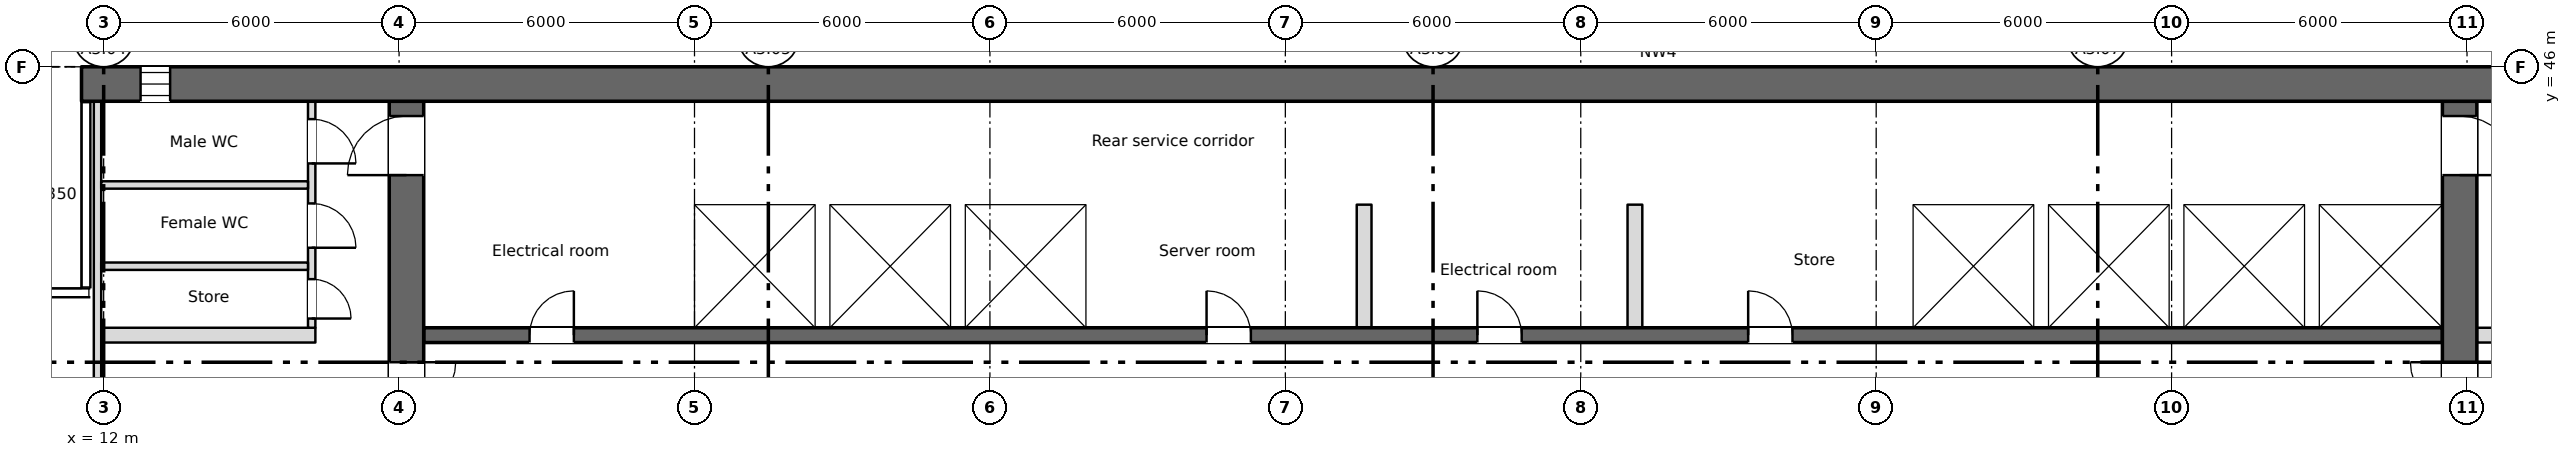
"""IFC4 building model, lengths in metres.
Left out: names, types, materials, properties, quantities, classifications, styles, units other than length and angle.
Written with IfcOpenShell. Run it as: python <this file> out.ifc"""

import sys

from ifc_helpers import new_model, si_unit, direction, frame, frame_2d, origin, place, context, subcontext, project, spatial, rectangle, extrude, element, fill, save


model = new_model("IFC4")
c1 = context("Model", 3, precision=1e-05, world=origin(), true_north=direction((0.0, 1.0)))
c2 = subcontext(c1, "Body", "Model", "MODEL_VIEW")
j1 = project(units=[si_unit("LENGTHUNIT", "METRE"), si_unit("PLANEANGLEUNIT", "RADIAN")], contexts=[c1])
p1 = place(None, origin())
s1 = spatial("IfcSite", under=j1, at=p1, CompositionType="ELEMENT")
p2 = place(p1, origin())
s2 = spatial("IfcBuilding", under=s1, at=p2, CompositionType="ELEMENT")
p3 = place(p2, frame((0.0, 0.0, 178.0)))
s3 = spatial("IfcBuildingStorey", under=s2, at=p3, CompositionType="ELEMENT", Elevation=178.0)
p4 = place(p3, frame((11.55, 45.65, 0.0), z_axis=(0.0, 0.0, 1.0), x_axis=(1.0, 0.0, 0.0)))
e1 = element("IfcWall", 1, at=p4, inside=s3, PredefinedType="SHEAR", context=c2, shape_type="SweptSolid", body=[
    extrude(rectangle(XDim=54.9, YDim=0.7, at=frame_2d((27.45, 0.0))), origin(), (0.0, 0.0, 1.0), 3.35),
])
p5 = place(p4, frame((1.2, 0.0, 0.6)))
e2 = element("IfcOpeningElement", 2, at=p5, cuts=e1, PredefinedType="OPENING", context=c2, shape_type="SweptSolid", body=[
    extrude(rectangle(XDim=0.6, YDim=2.4, at=frame_2d((0.3, 1.2))), frame((0.0, 0.36, 0.0), z_axis=(0.0, -1.0, 0.0), x_axis=(1.0, 0.0, 0.0)), (0.0, 0.0, 1.0), 0.72),
])
p6 = place(p3, frame((18.15, 28.4, 0.0), z_axis=(0.0, 0.0, 1.0), x_axis=(0.0, 1.0, 0.0)))
e3 = element("IfcWall", 3, at=p6, inside=s3, PredefinedType="SHEAR", context=c2, shape_type="SweptSolid", body=[
    extrude(rectangle(XDim=16.9, YDim=0.7, at=frame_2d((8.45, 0.0))), origin(), (0.0, 0.0, 1.0), 3.35),
])
p7 = place(p6, frame((9.6, 0.0, 0.0)))
e4 = element("IfcOpeningElement", 4, at=p7, cuts=e3, PredefinedType="OPENING", context=c2, shape_type="SweptSolid", body=[
    extrude(rectangle(XDim=2.0, YDim=2.1, at=frame_2d((1.0, 1.05))), frame((0.0, 0.36, 0.0), z_axis=(0.0, -1.0, 0.0), x_axis=(1.0, 0.0, 0.0)), (0.0, 0.0, 1.0), 0.72),
])
p8 = place(p6, frame((15.4, 0.0, 0.0)))
e5 = element("IfcOpeningElement", 5, at=p8, cuts=e3, PredefinedType="OPENING", context=c2, shape_type="SweptSolid", body=[
    extrude(rectangle(XDim=1.2, YDim=2.1, at=frame_2d((0.6, 1.05))), frame((0.0, 0.36, 0.0), z_axis=(0.0, -1.0, 0.0), x_axis=(1.0, 0.0, 0.0)), (0.0, 0.0, 1.0), 0.72),
])
p9 = place(p3, frame((59.85, 28.4, 0.0), z_axis=(0.0, 0.0, 1.0), x_axis=(0.0, 1.0, 0.0)))
e6 = element("IfcWall", 6, at=p9, inside=s3, PredefinedType="SHEAR", context=c2, shape_type="SweptSolid", body=[
    extrude(rectangle(XDim=16.9, YDim=0.7, at=frame_2d((8.45, 0.0))), origin(), (0.0, 0.0, 1.0), 3.35),
])
p10 = place(p9, frame((9.6, 0.0, 0.0)))
e7 = element("IfcOpeningElement", 7, at=p10, cuts=e6, PredefinedType="OPENING", context=c2, shape_type="SweptSolid", body=[
    extrude(rectangle(XDim=2.0, YDim=2.1, at=frame_2d((1.0, 1.05))), frame((0.0, 0.36, 0.0), z_axis=(0.0, -1.0, 0.0), x_axis=(1.0, 0.0, 0.0)), (0.0, 0.0, 1.0), 0.72),
])
p11 = place(p9, frame((15.4, 0.0, 0.0)))
e8 = element("IfcOpeningElement", 8, at=p11, cuts=e6, PredefinedType="OPENING", context=c2, shape_type="SweptSolid", body=[
    extrude(rectangle(XDim=1.2, YDim=2.1, at=frame_2d((0.6, 1.05))), frame((0.0, 0.36, 0.0), z_axis=(0.0, -1.0, 0.0), x_axis=(1.0, 0.0, 0.0)), (0.0, 0.0, 1.0), 0.72),
])
p12 = place(p3, frame((18.5, 40.55, 0.0), z_axis=(0.0, 0.0, 1.0), x_axis=(1.0, 0.0, 0.0)))
e9 = element("IfcWall", 9, at=p12, inside=s3, PredefinedType="SHEAR", context=c2, shape_type="SweptSolid", body=[
    extrude(rectangle(XDim=41.0, YDim=0.3, at=frame_2d((20.5, 0.0))), origin(), (0.0, 0.0, 1.0), 3.35),
])
p13 = place(p12, frame((2.15, 0.0, 0.0)))
e10 = element("IfcOpeningElement", 10, at=p13, cuts=e9, PredefinedType="OPENING", context=c2, shape_type="SweptSolid", body=[
    extrude(rectangle(XDim=0.9, YDim=2.1, at=frame_2d((0.45, 1.05))), frame((0.0, 0.16, 0.0), z_axis=(0.0, -1.0, 0.0), x_axis=(1.0, 0.0, 0.0)), (0.0, 0.0, 1.0), 0.32),
])
p14 = place(p12, frame((15.9, 0.0, 0.0)))
e11 = element("IfcOpeningElement", 11, at=p14, cuts=e9, PredefinedType="OPENING", context=c2, shape_type="SweptSolid", body=[
    extrude(rectangle(XDim=0.9, YDim=2.1, at=frame_2d((0.45, 1.05))), frame((0.0, 0.16, 0.0), z_axis=(0.0, -1.0, 0.0), x_axis=(1.0, 0.0, 0.0)), (0.0, 0.0, 1.0), 0.32),
])
p15 = place(p12, frame((21.4, 0.0, 0.0)))
e12 = element("IfcOpeningElement", 12, at=p15, cuts=e9, PredefinedType="OPENING", context=c2, shape_type="SweptSolid", body=[
    extrude(rectangle(XDim=0.9, YDim=2.1, at=frame_2d((0.45, 1.05))), frame((0.0, 0.16, 0.0), z_axis=(0.0, -1.0, 0.0), x_axis=(1.0, 0.0, 0.0)), (0.0, 0.0, 1.0), 0.32),
])
p16 = place(p12, frame((26.9, 0.0, 0.0)))
e13 = element("IfcOpeningElement", 13, at=p16, cuts=e9, PredefinedType="OPENING", context=c2, shape_type="SweptSolid", body=[
    extrude(rectangle(XDim=0.9, YDim=2.1, at=frame_2d((0.45, 1.05))), frame((0.0, 0.16, 0.0), z_axis=(0.0, -1.0, 0.0), x_axis=(1.0, 0.0, 0.0)), (0.0, 0.0, 1.0), 0.32),
])
p17 = place(p12, frame((6.175, 0.0, 0.0)))
e14 = element("IfcOpeningElement", 14, at=p17, cuts=e9, PredefinedType="OPENING", context=c2, shape_type="SweptSolid", body=[
    extrude(rectangle(XDim=1.1, YDim=2.1, at=frame_2d((0.55, 1.05))), frame((0.0, 0.16, 0.0), z_axis=(0.0, -1.0, 0.0), x_axis=(1.0, 0.0, 0.0)), (0.0, 0.0, 1.0), 0.32),
])
p18 = place(p12, frame((8.925, 0.0, 0.0)))
e15 = element("IfcOpeningElement", 15, at=p18, cuts=e9, PredefinedType="OPENING", context=c2, shape_type="SweptSolid", body=[
    extrude(rectangle(XDim=1.1, YDim=2.1, at=frame_2d((0.55, 1.05))), frame((0.0, 0.16, 0.0), z_axis=(0.0, -1.0, 0.0), x_axis=(1.0, 0.0, 0.0)), (0.0, 0.0, 1.0), 0.32),
])
p19 = place(p12, frame((11.675, 0.0, 0.0)))
e16 = element("IfcOpeningElement", 16, at=p19, cuts=e9, PredefinedType="OPENING", context=c2, shape_type="SweptSolid", body=[
    extrude(rectangle(XDim=1.1, YDim=2.1, at=frame_2d((0.55, 1.05))), frame((0.0, 0.16, 0.0), z_axis=(0.0, -1.0, 0.0), x_axis=(1.0, 0.0, 0.0)), (0.0, 0.0, 1.0), 0.32),
])
p20 = place(p12, frame((30.925, 0.0, 0.0)))
e17 = element("IfcOpeningElement", 17, at=p20, cuts=e9, PredefinedType="OPENING", context=c2, shape_type="SweptSolid", body=[
    extrude(rectangle(XDim=1.1, YDim=2.1, at=frame_2d((0.55, 1.05))), frame((0.0, 0.16, 0.0), z_axis=(0.0, -1.0, 0.0), x_axis=(1.0, 0.0, 0.0)), (0.0, 0.0, 1.0), 0.32),
])
p21 = place(p12, frame((33.675, 0.0, 0.0)))
e18 = element("IfcOpeningElement", 18, at=p21, cuts=e9, PredefinedType="OPENING", context=c2, shape_type="SweptSolid", body=[
    extrude(rectangle(XDim=1.1, YDim=2.1, at=frame_2d((0.55, 1.05))), frame((0.0, 0.16, 0.0), z_axis=(0.0, -1.0, 0.0), x_axis=(1.0, 0.0, 0.0)), (0.0, 0.0, 1.0), 0.32),
])
p22 = place(p12, frame((36.375, 0.0, 0.0)))
e19 = element("IfcOpeningElement", 19, at=p22, cuts=e9, PredefinedType="OPENING", context=c2, shape_type="SweptSolid", body=[
    extrude(rectangle(XDim=1.2, YDim=2.1, at=frame_2d((0.6, 1.05))), frame((0.0, 0.16, 0.0), z_axis=(0.0, -1.0, 0.0), x_axis=(1.0, 0.0, 0.0)), (0.0, 0.0, 1.0), 0.32),
])
p23 = place(p12, frame((39.15, 0.0, 0.0)))
e20 = element("IfcOpeningElement", 20, at=p23, cuts=e9, PredefinedType="OPENING", context=c2, shape_type="SweptSolid", body=[
    extrude(rectangle(XDim=1.2, YDim=2.1, at=frame_2d((0.6, 1.05))), frame((0.0, 0.16, 0.0), z_axis=(0.0, -1.0, 0.0), x_axis=(1.0, 0.0, 0.0)), (0.0, 0.0, 1.0), 0.32),
])
p24 = place(p3, frame((18.5, 43.35, 0.0), z_axis=(0.0, 0.0, 1.0), x_axis=(1.0, 0.0, 0.0)))
e21 = element("IfcWall", 21, at=p24, inside=s3, PredefinedType="SHEAR", context=c2, shape_type="SweptSolid", body=[
    extrude(rectangle(XDim=41.0, YDim=0.3, at=frame_2d((20.5, 0.0))), origin(), (0.0, 0.0, 1.0), 3.35),
])
p25 = place(p3, frame((11.95, 40.55, 0.0), z_axis=(0.0, 0.0, 1.0), x_axis=(1.0, 0.0, 0.0)))
e22 = element("IfcWall", 22, at=p25, inside=s3, PredefinedType="PARTITIONING", context=c2, shape_type="SweptSolid", body=[
    extrude(rectangle(XDim=4.35, YDim=0.3, at=frame_2d((2.175, 0.0))), origin(), (0.0, 0.0, 1.0), 3.35),
])
p26 = place(p3, frame((60.2, 40.55, 0.0), z_axis=(0.0, 0.0, 1.0), x_axis=(1.0, 0.0, 0.0)))
e23 = element("IfcWall", 23, at=p26, inside=s3, PredefinedType="PARTITIONING", context=c2, shape_type="SweptSolid", body=[
    extrude(rectangle(XDim=2.5, YDim=0.3, at=frame_2d((1.25, 0.0))), origin(), (0.0, 0.0, 1.0), 3.35),
])
p27 = place(p26, frame((0.725, 0.0, 0.0)))
e24 = element("IfcOpeningElement", 24, at=p27, cuts=e23, PredefinedType="OPENING", context=c2, shape_type="SweptSolid", body=[
    extrude(rectangle(XDim=0.9, YDim=2.1, at=frame_2d((0.45, 1.05))), frame((0.0, 0.16, 0.0), z_axis=(0.0, -1.0, 0.0), x_axis=(1.0, 0.0, 0.0)), (0.0, 0.0, 1.0), 0.32),
])
for number, where, z_axis, x_axis in (
    (25, (23.85, 40.7, 0.0), (0.0, 0.0, 1.0), (0.0, 1.0, 0.0)),
    (26, (26.6, 40.7, 0.0), (0.0, 0.0, 1.0), (0.0, 1.0, 0.0)),
    (27, (29.35, 40.7, 0.0), (0.0, 0.0, 1.0), (0.0, 1.0, 0.0)),
    (28, (32.1, 40.7, 0.0), (0.0, 0.0, 1.0), (0.0, 1.0, 0.0)),
    (29, (48.6, 40.7, 0.0), (0.0, 0.0, 1.0), (0.0, 1.0, 0.0)),
    (30, (51.35, 40.7, 0.0), (0.0, 0.0, 1.0), (0.0, 1.0, 0.0)),
    (31, (54.1, 40.7, 0.0), (0.0, 0.0, 1.0), (0.0, 1.0, 0.0)),
    (32, (56.85, 40.7, 0.0), (0.0, 0.0, 1.0), (0.0, 1.0, 0.0)),
):
    element("IfcWall", number, at=place(p3, frame(where, z_axis=z_axis, x_axis=x_axis)), inside=s3, PredefinedType="SHEAR", context=c2, shape_type="SweptSolid", body=[
        extrude(rectangle(XDim=2.5, YDim=0.3, at=frame_2d((1.25, 0.0))), origin(), (0.0, 0.0, 1.0), 3.35),
    ])
p28 = place(p3, frame((16.225, 45.3, 0.0), z_axis=(0.0, 0.0, 1.0), x_axis=(0.0, -1.0, 0.0)))
e33 = element("IfcWall", 33, at=p28, inside=s3, PredefinedType="PARTITIONING", context=c2, shape_type="SweptSolid", body=[
    extrude(rectangle(XDim=4.6, YDim=0.15, at=frame_2d((2.3, 0.0))), origin(), (0.0, 0.0, 1.0), 3.35),
])
p29 = place(p28, frame((3.613, 0.0, 0.0)))
e34 = element("IfcOpeningElement", 34, at=p29, cuts=e33, PredefinedType="OPENING", context=c2, shape_type="SweptSolid", body=[
    extrude(rectangle(XDim=0.8, YDim=2.1, at=frame_2d((0.4, 1.05))), frame((0.0, 0.085, 0.0), z_axis=(0.0, -1.0, 0.0), x_axis=(1.0, 0.0, 0.0)), (0.0, 0.0, 1.0), 0.17),
])
p30 = place(p28, frame((2.075, 0.0, 0.0)))
e35 = element("IfcOpeningElement", 35, at=p30, cuts=e33, PredefinedType="OPENING", context=c2, shape_type="SweptSolid", body=[
    extrude(rectangle(XDim=0.9, YDim=2.1, at=frame_2d((0.45, 1.05))), frame((0.0, 0.085, 0.0), z_axis=(0.0, -1.0, 0.0), x_axis=(1.0, 0.0, 0.0)), (0.0, 0.0, 1.0), 0.17),
])
p31 = place(p28, frame((0.363, 0.0, 0.0)))
e36 = element("IfcOpeningElement", 36, at=p31, cuts=e33, PredefinedType="OPENING", context=c2, shape_type="SweptSolid", body=[
    extrude(rectangle(XDim=0.9, YDim=2.1, at=frame_2d((0.45, 1.05))), frame((0.0, 0.085, 0.0), z_axis=(0.0, -1.0, 0.0), x_axis=(1.0, 0.0, 0.0)), (0.0, 0.0, 1.0), 0.17),
])
p32 = place(p3, frame((11.875, 39.45, 0.0), z_axis=(0.0, 0.0, 1.0), x_axis=(0.0, 1.0, 0.0)))
e37 = element("IfcWall", 37, at=p32, inside=s3, PredefinedType="PARTITIONING", context=c2, shape_type="SweptSolid", body=[
    extrude(rectangle(XDim=5.85, YDim=0.15, at=frame_2d((2.925, 0.0))), origin(), (0.0, 0.0, 1.0), 3.35),
])
for number, where, z_axis, x_axis in (
    (38, (11.95, 41.95, 0.0), (0.0, 0.0, 1.0), (1.0, 0.0, 0.0)),
    (39, (11.95, 43.6, 0.0), (0.0, 0.0, 1.0), (1.0, 0.0, 0.0)),
):
    element("IfcWall", number, at=place(p3, frame(where, z_axis=z_axis, x_axis=x_axis)), inside=s3, PredefinedType="PARTITIONING", context=c2, shape_type="SweptSolid", body=[
        extrude(rectangle(XDim=4.2, YDim=0.15, at=frame_2d((2.1, 0.0))), origin(), (0.0, 0.0, 1.0), 3.35),
    ])
for number, where, z_axis, x_axis in (
    (40, (37.6, 40.7, 0.0), (0.0, 0.0, 1.0), (0.0, 1.0, 0.0)),
    (41, (43.1, 40.7, 0.0), (0.0, 0.0, 1.0), (0.0, 1.0, 0.0)),
):
    element("IfcWall", number, at=place(p3, frame(where, z_axis=z_axis, x_axis=x_axis)), inside=s3, PredefinedType="PARTITIONING", context=c2, shape_type="SweptSolid", body=[
        extrude(rectangle(XDim=2.5, YDim=0.3, at=frame_2d((1.25, 0.0))), origin(), (0.0, 0.0, 1.0), 3.35),
    ])
p33 = place(p5, origin())
e42 = element("IfcWindow", 42, at=p33, inside=s3, PartitioningType="SINGLE_PANEL", PredefinedType="WINDOW", context=c2, shape_type="SweptSolid", body=[
    extrude(rectangle(XDim=0.6, YDim=2.4, at=frame_2d((0.3, 1.2))), frame((0.0, 0.03, 0.0), z_axis=(0.0, -1.0, 0.0), x_axis=(1.0, 0.0, 0.0)), (0.0, 0.0, 1.0), 0.06),
])
fill(e2, e42)
p34 = place(p29, origin())
e43 = element("IfcDoor", 43, at=p34, inside=s3, OperationType="SINGLE_SWING_RIGHT", PredefinedType="DOOR", context=c2, shape_type="SweptSolid", body=[
    extrude(rectangle(XDim=0.8, YDim=2.1, at=frame_2d((0.4, 1.05))), frame((0.0, 0.025, 0.0), z_axis=(0.0, -1.0, 0.0), x_axis=(1.0, 0.0, 0.0)), (0.0, 0.0, 1.0), 0.05),
])
fill(e34, e43)
p35 = place(p30, origin())
e44 = element("IfcDoor", 44, at=p35, inside=s3, OperationType="SINGLE_SWING_RIGHT", PredefinedType="DOOR", context=c2, shape_type="SweptSolid", body=[
    extrude(rectangle(XDim=0.9, YDim=2.1, at=frame_2d((0.45, 1.05))), frame((0.0, 0.025, 0.0), z_axis=(0.0, -1.0, 0.0), x_axis=(1.0, 0.0, 0.0)), (0.0, 0.0, 1.0), 0.05),
])
fill(e35, e44)
p36 = place(p31, origin())
e45 = element("IfcDoor", 45, at=p36, inside=s3, OperationType="SINGLE_SWING_RIGHT", PredefinedType="DOOR", context=c2, shape_type="SweptSolid", body=[
    extrude(rectangle(XDim=0.9, YDim=2.1, at=frame_2d((0.45, 1.05))), frame((0.0, 0.025, 0.0), z_axis=(0.0, -1.0, 0.0), x_axis=(1.0, 0.0, 0.0)), (0.0, 0.0, 1.0), 0.05),
])
fill(e36, e45)
p37 = place(p13, origin())
e46 = element("IfcDoor", 46, at=p37, inside=s3, OperationType="SINGLE_SWING_RIGHT", PredefinedType="DOOR", context=c2, shape_type="SweptSolid", body=[
    extrude(rectangle(XDim=0.9, YDim=2.1, at=frame_2d((0.45, 1.05))), frame((0.0, 0.025, 0.0), z_axis=(0.0, -1.0, 0.0), x_axis=(1.0, 0.0, 0.0)), (0.0, 0.0, 1.0), 0.05),
])
fill(e10, e46)
p38 = place(p14, origin())
e47 = element("IfcDoor", 47, at=p38, inside=s3, OperationType="SINGLE_SWING_LEFT", PredefinedType="DOOR", context=c2, shape_type="SweptSolid", body=[
    extrude(rectangle(XDim=0.9, YDim=2.1, at=frame_2d((0.45, 1.05))), frame((0.0, 0.025, 0.0), z_axis=(0.0, -1.0, 0.0), x_axis=(1.0, 0.0, 0.0)), (0.0, 0.0, 1.0), 0.05),
])
fill(e11, e47)
p39 = place(p15, origin())
e48 = element("IfcDoor", 48, at=p39, inside=s3, OperationType="SINGLE_SWING_LEFT", PredefinedType="DOOR", context=c2, shape_type="SweptSolid", body=[
    extrude(rectangle(XDim=0.9, YDim=2.1, at=frame_2d((0.45, 1.05))), frame((0.0, 0.025, 0.0), z_axis=(0.0, -1.0, 0.0), x_axis=(1.0, 0.0, 0.0)), (0.0, 0.0, 1.0), 0.05),
])
fill(e12, e48)
p40 = place(p16, origin())
e49 = element("IfcDoor", 49, at=p40, inside=s3, OperationType="SINGLE_SWING_LEFT", PredefinedType="DOOR", context=c2, shape_type="SweptSolid", body=[
    extrude(rectangle(XDim=0.9, YDim=2.1, at=frame_2d((0.45, 1.05))), frame((0.0, 0.025, 0.0), z_axis=(0.0, -1.0, 0.0), x_axis=(1.0, 0.0, 0.0)), (0.0, 0.0, 1.0), 0.05),
])
fill(e13, e49)
p41 = place(p17, origin())
e50 = element("IfcDoor", 50, at=p41, inside=s3, OperationType="SLIDING_TO_LEFT", PredefinedType="DOOR", context=c2, shape_type="SweptSolid", body=[
    extrude(rectangle(XDim=1.1, YDim=2.1, at=frame_2d((0.55, 1.05))), frame((0.0, 0.025, 0.0), z_axis=(0.0, -1.0, 0.0), x_axis=(1.0, 0.0, 0.0)), (0.0, 0.0, 1.0), 0.05),
])
fill(e14, e50)
p42 = place(p18, origin())
e51 = element("IfcDoor", 51, at=p42, inside=s3, OperationType="SLIDING_TO_LEFT", PredefinedType="DOOR", context=c2, shape_type="SweptSolid", body=[
    extrude(rectangle(XDim=1.1, YDim=2.1, at=frame_2d((0.55, 1.05))), frame((0.0, 0.025, 0.0), z_axis=(0.0, -1.0, 0.0), x_axis=(1.0, 0.0, 0.0)), (0.0, 0.0, 1.0), 0.05),
])
fill(e15, e51)
p43 = place(p19, origin())
e52 = element("IfcDoor", 52, at=p43, inside=s3, OperationType="SLIDING_TO_LEFT", PredefinedType="DOOR", context=c2, shape_type="SweptSolid", body=[
    extrude(rectangle(XDim=1.1, YDim=2.1, at=frame_2d((0.55, 1.05))), frame((0.0, 0.025, 0.0), z_axis=(0.0, -1.0, 0.0), x_axis=(1.0, 0.0, 0.0)), (0.0, 0.0, 1.0), 0.05),
])
fill(e16, e52)
p44 = place(p20, origin())
e53 = element("IfcDoor", 53, at=p44, inside=s3, OperationType="SLIDING_TO_LEFT", PredefinedType="DOOR", context=c2, shape_type="SweptSolid", body=[
    extrude(rectangle(XDim=1.1, YDim=2.1, at=frame_2d((0.55, 1.05))), frame((0.0, 0.025, 0.0), z_axis=(0.0, -1.0, 0.0), x_axis=(1.0, 0.0, 0.0)), (0.0, 0.0, 1.0), 0.05),
])
fill(e17, e53)
p45 = place(p21, origin())
e54 = element("IfcDoor", 54, at=p45, inside=s3, OperationType="SLIDING_TO_LEFT", PredefinedType="DOOR", context=c2, shape_type="SweptSolid", body=[
    extrude(rectangle(XDim=1.1, YDim=2.1, at=frame_2d((0.55, 1.05))), frame((0.0, 0.025, 0.0), z_axis=(0.0, -1.0, 0.0), x_axis=(1.0, 0.0, 0.0)), (0.0, 0.0, 1.0), 0.05),
])
fill(e18, e54)
p46 = place(p22, origin())
e55 = element("IfcDoor", 55, at=p46, inside=s3, OperationType="SLIDING_TO_LEFT", PredefinedType="DOOR", context=c2, shape_type="SweptSolid", body=[
    extrude(rectangle(XDim=1.2, YDim=2.1, at=frame_2d((0.6, 1.05))), frame((0.0, 0.025, 0.0), z_axis=(0.0, -1.0, 0.0), x_axis=(1.0, 0.0, 0.0)), (0.0, 0.0, 1.0), 0.05),
])
fill(e19, e55)
p47 = place(p23, origin())
e56 = element("IfcDoor", 56, at=p47, inside=s3, OperationType="SLIDING_TO_LEFT", PredefinedType="DOOR", context=c2, shape_type="SweptSolid", body=[
    extrude(rectangle(XDim=1.2, YDim=2.1, at=frame_2d((0.6, 1.05))), frame((0.0, 0.025, 0.0), z_axis=(0.0, -1.0, 0.0), x_axis=(1.0, 0.0, 0.0)), (0.0, 0.0, 1.0), 0.05),
])
fill(e20, e56)
p48 = place(p7, origin())
e57 = element("IfcDoor", 57, at=p48, inside=s3, OperationType="DOUBLE_DOOR_SINGLE_SWING", PredefinedType="DOOR", context=c2, shape_type="SweptSolid", body=[
    extrude(rectangle(XDim=2.0, YDim=2.1, at=frame_2d((1.0, 1.05))), frame((0.0, 0.025, 0.0), z_axis=(0.0, -1.0, 0.0), x_axis=(1.0, 0.0, 0.0)), (0.0, 0.0, 1.0), 0.05),
])
fill(e4, e57)
p49 = place(p10, origin())
e58 = element("IfcDoor", 58, at=p49, inside=s3, OperationType="DOUBLE_DOOR_SINGLE_SWING", PredefinedType="DOOR", context=c2, shape_type="SweptSolid", body=[
    extrude(rectangle(XDim=2.0, YDim=2.1, at=frame_2d((1.0, 1.05))), frame((0.0, 0.025, 0.0), z_axis=(0.0, -1.0, 0.0), x_axis=(1.0, 0.0, 0.0)), (0.0, 0.0, 1.0), 0.05),
])
fill(e7, e58)
p50 = place(p8, origin())
e59 = element("IfcDoor", 59, at=p50, inside=s3, OperationType="SINGLE_SWING_LEFT", PredefinedType="DOOR", context=c2, shape_type="SweptSolid", body=[
    extrude(rectangle(XDim=1.2, YDim=2.1, at=frame_2d((0.6, 1.05))), frame((0.0, 0.025, 0.0), z_axis=(0.0, -1.0, 0.0), x_axis=(1.0, 0.0, 0.0)), (0.0, 0.0, 1.0), 0.05),
])
fill(e5, e59)
p51 = place(p11, origin())
e60 = element("IfcDoor", 60, at=p51, inside=s3, OperationType="SINGLE_SWING_LEFT", PredefinedType="DOOR", context=c2, shape_type="SweptSolid", body=[
    extrude(rectangle(XDim=1.2, YDim=2.1, at=frame_2d((0.6, 1.05))), frame((0.0, 0.025, 0.0), z_axis=(0.0, -1.0, 0.0), x_axis=(1.0, 0.0, 0.0)), (0.0, 0.0, 1.0), 0.05),
])
fill(e8, e60)
save(model, sys.argv[1])
